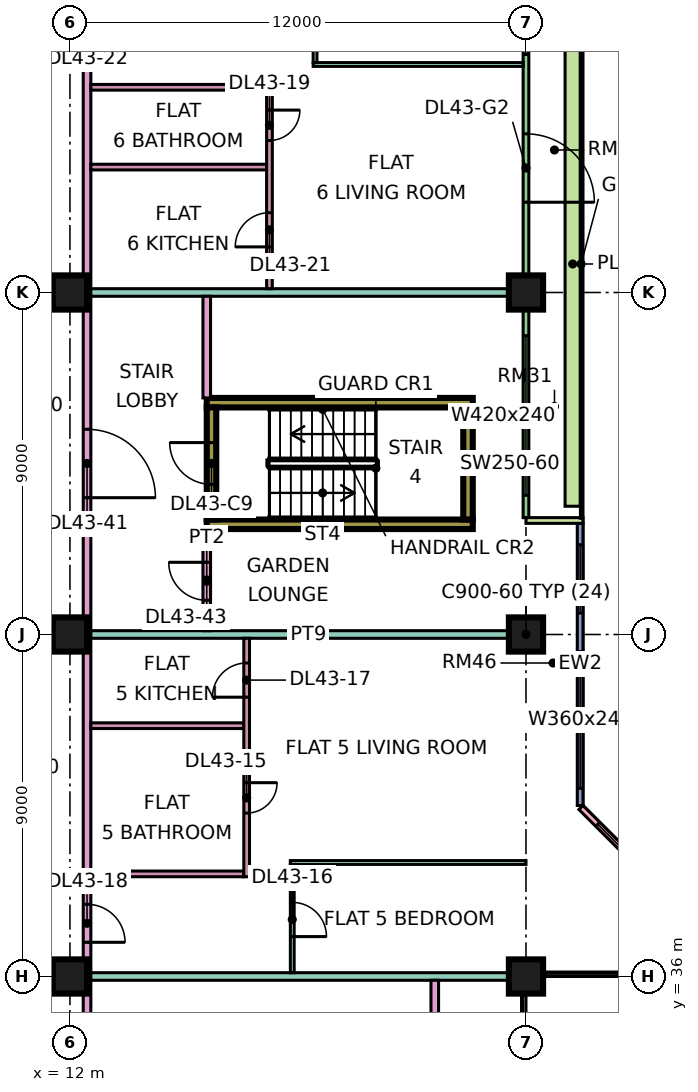
"""IFC4 building model, lengths in metres.
Left out: names, types, materials, properties, quantities, classifications, styles, units other than length and angle.
Written with IfcOpenShell. Run it as: python <this file> out.ifc"""

import sys

from ifc_helpers import new_model, si_unit, direction, frame, frame_2d, origin, origin_2d, place, context, subcontext, project, spatial, rectangle, extrude, element, fill, save


model = new_model("IFC4")
c1 = context("Model", 3, precision=1e-05, world=origin(), true_north=direction((0.0, 1.0)))
c2 = subcontext(c1, "Body", "Model", "MODEL_VIEW")
j1 = project(units=[si_unit("LENGTHUNIT", "METRE"), si_unit("PLANEANGLEUNIT", "RADIAN")], contexts=[c1])
p1 = place(None, origin())
s1 = spatial("IfcSite", under=j1, at=p1, CompositionType="ELEMENT")
p2 = place(p1, origin())
s2 = spatial("IfcBuilding", under=s1, at=p2, CompositionType="ELEMENT")
p3 = place(p2, frame((0.0, 0.0, 187.4)))
s3 = spatial("IfcBuildingStorey", under=s2, at=p3, CompositionType="ELEMENT", Elevation=187.4)
for number, where, z_axis, x_axis in (
    (1, (12.0, 36.0, 0.0), (0.0, 0.0, 1.0), (1.0, 0.0, 0.0)),
    (2, (12.0, 45.0, 0.0), (0.0, 0.0, 1.0), (1.0, 0.0, 0.0)),
    (3, (12.0, 54.0, 0.0), (0.0, 0.0, 1.0), (1.0, 0.0, 0.0)),
    (4, (24.0, 36.0, 0.0), (0.0, 0.0, 1.0), (1.0, 0.0, 0.0)),
    (5, (24.0, 45.0, 0.0), (0.0, 0.0, 1.0), (1.0, 0.0, 0.0)),
    (6, (24.0, 54.0, 0.0), (0.0, 0.0, 1.0), (1.0, 0.0, 0.0)),
):
    element("IfcColumn", number, at=place(p3, frame(where, z_axis=z_axis, x_axis=x_axis)), inside=s3, PredefinedType="COLUMN", context=c2, shape_type="SweptSolid", body=[
        extrude(rectangle(XDim=0.9, YDim=0.9, at=origin_2d()), origin(), (0.0, 0.0, 1.0), 3.75),
    ])
for number, where, z_axis, x_axis in (
    (7, (15.6, 47.9, 0.0), (0.0, 0.0, 1.0), (1.0, 0.0, 0.0)),
    (8, (15.6, 51.1, 0.0), (0.0, 0.0, 1.0), (1.0, 0.0, 0.0)),
):
    element("IfcWall", number, at=place(p3, frame(where, z_axis=z_axis, x_axis=x_axis)), inside=s3, PredefinedType="SHEAR", context=c2, shape_type="SweptSolid", body=[
        extrude(rectangle(XDim=7.0, YDim=0.25, at=frame_2d((3.5, 0.0))), origin(), (0.0, 0.0, 1.0), 3.75),
    ])
p4 = place(p3, frame((15.725, 48.025, 0.0), z_axis=(0.0, 0.0, 1.0), x_axis=(0.0, 1.0, 0.0)))
e9 = element("IfcWall", 9, at=p4, inside=s3, PredefinedType="SHEAR", context=c2, shape_type="SweptSolid", body=[
    extrude(rectangle(XDim=2.95, YDim=0.25, at=frame_2d((1.475, 0.0))), origin(), (0.0, 0.0, 1.0), 3.75),
])
p5 = place(p4, frame((0.925, 0.0, 0.0)))
e10 = element("IfcOpeningElement", 10, at=p5, cuts=e9, PredefinedType="OPENING", context=c2, shape_type="SweptSolid", body=[
    extrude(rectangle(XDim=1.1, YDim=2.2, at=frame_2d((0.55, 1.1))), frame((0.0, 0.135, 0.0), z_axis=(0.0, -1.0, 0.0), x_axis=(1.0, 0.0, 0.0)), (0.0, 0.0, 1.0), 0.27),
])
p6 = place(p3, frame((22.475, 48.025, 0.0), z_axis=(0.0, 0.0, 1.0), x_axis=(0.0, 1.0, 0.0)))
e11 = element("IfcWall", 11, at=p6, inside=s3, PredefinedType="SHEAR", context=c2, shape_type="SweptSolid", body=[
    extrude(rectangle(XDim=2.95, YDim=0.25, at=frame_2d((1.475, 0.0))), origin(), (0.0, 0.0, 1.0), 3.75),
])
p7 = place(p3, frame((28.447, 37.447, 0.0), z_axis=(0.0, 0.0, 1.0), x_axis=(-0.707106781187, 0.707106781187, 0.0)))
e12 = element("IfcWall", 12, at=p7, inside=s3, PredefinedType="SOLIDWALL", context=c2, shape_type="SweptSolid", body=[
    extrude(rectangle(XDim=4.243, YDim=0.15, at=frame_2d((2.121, 0.0))), origin(), (0.0, 0.0, 1.0), 3.35),
])
p8 = place(p7, frame((0.621, 0.0, 0.45)))
e13 = element("IfcOpeningElement", 13, at=p8, cuts=e12, PredefinedType="OPENING", context=c2, shape_type="SweptSolid", body=[
    extrude(rectangle(XDim=3.0, YDim=2.4, at=frame_2d((1.5, 1.2))), frame((0.0, 0.085, 0.0), z_axis=(0.0, -1.0, 0.0), x_axis=(1.0, 0.0, 0.0)), (0.0, 0.0, 1.0), 0.17),
])
p9 = place(p3, frame((25.425, 40.5, 0.0), z_axis=(0.0, 0.0, 1.0), x_axis=(0.0, 1.0, 0.0)))
e14 = element("IfcWall", 14, at=p9, inside=s3, PredefinedType="SOLIDWALL", context=c2, shape_type="SweptSolid", body=[
    extrude(rectangle(XDim=7.425, YDim=0.15, at=frame_2d((3.712, 0.0))), origin(), (0.0, 0.0, 1.0), 3.35),
])
p10 = place(p9, frame((0.45, 0.0, 0.45)))
e15 = element("IfcOpeningElement", 15, at=p10, cuts=e14, PredefinedType="OPENING", context=c2, shape_type="SweptSolid", body=[
    extrude(rectangle(XDim=3.6, YDim=2.4, at=frame_2d((1.8, 1.2))), frame((0.0, 0.085, 0.0), z_axis=(0.0, -1.0, 0.0), x_axis=(1.0, 0.0, 0.0)), (0.0, 0.0, 1.0), 0.17),
])
p11 = place(p9, frame((5.062, 0.0, 0.45)))
e16 = element("IfcOpeningElement", 16, at=p11, cuts=e14, PredefinedType="OPENING", context=c2, shape_type="SweptSolid", body=[
    extrude(rectangle(XDim=1.8, YDim=2.4, at=frame_2d((0.9, 1.2))), frame((0.0, 0.085, 0.0), z_axis=(0.0, -1.0, 0.0), x_axis=(1.0, 0.0, 0.0)), (0.0, 0.0, 1.0), 0.17),
])
p12 = place(p3, frame((24.0, 48.075, 0.0), z_axis=(0.0, 0.0, 1.0), x_axis=(0.0, 1.0, 0.0)))
e17 = element("IfcWall", 17, at=p12, inside=s3, PredefinedType="SOLIDWALL", context=c2, shape_type="SweptSolid", body=[
    extrude(rectangle(XDim=13.35, YDim=0.15, at=frame_2d((6.675, 0.0))), origin(), (0.0, 0.0, 1.0), 3.35),
])
p13 = place(p12, frame((0.587, 0.0, 0.45)))
e18 = element("IfcOpeningElement", 18, at=p13, cuts=e17, PredefinedType="OPENING", context=c2, shape_type="SweptSolid", body=[
    extrude(rectangle(XDim=4.2, YDim=2.4, at=frame_2d((2.1, 1.2))), frame((0.0, 0.085, 0.0), z_axis=(0.0, -1.0, 0.0), x_axis=(1.0, 0.0, 0.0)), (0.0, 0.0, 1.0), 0.17),
])
p14 = place(p12, frame((8.3, 0.0, 0.0)))
e19 = element("IfcOpeningElement", 19, at=p14, cuts=e17, PredefinedType="OPENING", context=c2, shape_type="SweptSolid", body=[
    extrude(rectangle(XDim=1.8, YDim=2.4, at=frame_2d((0.9, 1.2))), frame((0.0, 0.085, 0.0), z_axis=(0.0, -1.0, 0.0), x_axis=(1.0, 0.0, 0.0)), (0.0, 0.0, 1.0), 0.17),
])
p15 = place(p12, frame((12.188, 0.0, 0.45)))
e20 = element("IfcOpeningElement", 20, at=p15, cuts=e17, PredefinedType="OPENING", context=c2, shape_type="SweptSolid", body=[
    extrude(rectangle(XDim=0.9, YDim=2.4, at=frame_2d((0.45, 1.2))), frame((0.0, 0.085, 0.0), z_axis=(0.0, -1.0, 0.0), x_axis=(1.0, 0.0, 0.0)), (0.0, 0.0, 1.0), 0.17),
])
p16 = place(p3, frame((25.5, 48.0, 0.0), z_axis=(0.0, 0.0, 1.0), x_axis=(-1.0, 0.0, 0.0)))
e21 = element("IfcWall", 21, at=p16, inside=s3, PredefinedType="SOLIDWALL", context=c2, shape_type="SweptSolid", body=[
    extrude(rectangle(XDim=1.5, YDim=0.15, at=frame_2d((0.75, 0.0))), origin(), (0.0, 0.0, 1.0), 3.35),
])
p17 = place(p3, frame((25.229, 48.375, 0.0), z_axis=(0.0, 0.0, 1.0), x_axis=(0.0, 1.0, 0.0)))
e22 = element("IfcWall", 22, at=p17, inside=s3, PredefinedType="SOLIDWALL", context=c2, shape_type="SweptSolid", body=[
    extrude(rectangle(XDim=12.75, YDim=0.4, at=frame_2d((6.375, 0.0))), origin(), (0.0, 0.0, 1.0), 0.7),
])
p18 = place(p3, frame((12.45, 20.0, 0.0), z_axis=(0.0, 0.0, 1.0), x_axis=(0.0, 1.0, 0.0)))
e23 = element("IfcWall", 23, at=p18, inside=s3, PredefinedType="PARTITIONING", context=c2, shape_type="SweptSolid", body=[
    extrude(rectangle(XDim=43.0, YDim=0.2, at=frame_2d((21.5, 0.0))), origin(), (0.0, 0.0, 1.0), 3.35),
])
p19 = place(p18, frame((6.7, 0.0, 0.0)))
e24 = element("IfcOpeningElement", 24, at=p19, cuts=e23, PredefinedType="OPENING", context=c2, shape_type="SweptSolid", body=[
    extrude(rectangle(XDim=1.6, YDim=2.1, at=frame_2d((0.8, 1.05))), frame((0.0, 0.11, 0.0), z_axis=(0.0, -1.0, 0.0), x_axis=(1.0, 0.0, 0.0)), (0.0, 0.0, 1.0), 0.22),
])
p20 = place(p18, frame((12.95, 0.0, 0.0)))
e25 = element("IfcOpeningElement", 25, at=p20, cuts=e23, PredefinedType="OPENING", context=c2, shape_type="SweptSolid", body=[
    extrude(rectangle(XDim=1.0, YDim=2.1, at=frame_2d((0.5, 1.05))), frame((0.0, 0.11, 0.0), z_axis=(0.0, -1.0, 0.0), x_axis=(1.0, 0.0, 0.0)), (0.0, 0.0, 1.0), 0.22),
])
p21 = place(p18, frame((16.9, 0.0, 0.0)))
e26 = element("IfcOpeningElement", 26, at=p21, cuts=e23, PredefinedType="OPENING", context=c2, shape_type="SweptSolid", body=[
    extrude(rectangle(XDim=1.0, YDim=2.1, at=frame_2d((0.5, 1.05))), frame((0.0, 0.11, 0.0), z_axis=(0.0, -1.0, 0.0), x_axis=(1.0, 0.0, 0.0)), (0.0, 0.0, 1.0), 0.22),
])
p22 = place(p18, frame((40.75, 0.0, 0.0)))
e27 = element("IfcOpeningElement", 27, at=p22, cuts=e23, PredefinedType="OPENING", context=c2, shape_type="SweptSolid", body=[
    extrude(rectangle(XDim=1.0, YDim=2.1, at=frame_2d((0.5, 1.05))), frame((0.0, 0.11, 0.0), z_axis=(0.0, -1.0, 0.0), x_axis=(1.0, 0.0, 0.0)), (0.0, 0.0, 1.0), 0.22),
])
p23 = place(p18, frame((1.15, 0.0, 0.0)))
e28 = element("IfcOpeningElement", 28, at=p23, cuts=e23, PredefinedType="OPENING", context=c2, shape_type="SweptSolid", body=[
    extrude(rectangle(XDim=1.8, YDim=2.1, at=frame_2d((0.9, 1.05))), frame((0.0, 0.11, 0.0), z_axis=(0.0, -1.0, 0.0), x_axis=(1.0, 0.0, 0.0)), (0.0, 0.0, 1.0), 0.22),
])
p24 = place(p18, frame((28.6, 0.0, 0.0)))
e29 = element("IfcOpeningElement", 29, at=p24, cuts=e23, PredefinedType="OPENING", context=c2, shape_type="SweptSolid", body=[
    extrude(rectangle(XDim=1.8, YDim=2.1, at=frame_2d((0.9, 1.05))), frame((0.0, 0.11, 0.0), z_axis=(0.0, -1.0, 0.0), x_axis=(1.0, 0.0, 0.0)), (0.0, 0.0, 1.0), 0.22),
])
p25 = place(p3, frame((12.55, 36.0, 0.0), z_axis=(0.0, 0.0, 1.0), x_axis=(1.0, 0.0, 0.0)))
e30 = element("IfcWall", 30, at=p25, inside=s3, PredefinedType="PARTITIONING", context=c2, shape_type="SweptSolid", body=[
    extrude(rectangle(XDim=11.45, YDim=0.2, at=frame_2d((5.725, 0.0))), origin(), (0.0, 0.0, 1.0), 3.35),
])
for number, where, z_axis, x_axis in (
    (31, (12.55, 38.7, 0.0), (0.0, 0.0, 1.0), (1.0, 0.0, 0.0)),
    (32, (12.55, 42.6, 0.0), (0.0, 0.0, 1.0), (1.0, 0.0, 0.0)),
):
    element("IfcWall", number, at=place(p3, frame(where, z_axis=z_axis, x_axis=x_axis)), inside=s3, PredefinedType="PARTITIONING", context=c2, shape_type="SweptSolid", body=[
        extrude(rectangle(XDim=4.025, YDim=0.15, at=frame_2d((2.012, 0.0))), origin(), (0.0, 0.0, 1.0), 3.35),
    ])
p26 = place(p3, frame((12.55, 45.0, 0.0), z_axis=(0.0, 0.0, 1.0), x_axis=(1.0, 0.0, 0.0)))
e33 = element("IfcWall", 33, at=p26, inside=s3, PredefinedType="PARTITIONING", context=c2, shape_type="SweptSolid", body=[
    extrude(rectangle(XDim=11.45, YDim=0.2, at=frame_2d((5.725, 0.0))), origin(), (0.0, 0.0, 1.0), 3.35),
])
p27 = place(p3, frame((12.55, 54.0, 0.0), z_axis=(0.0, 0.0, 1.0), x_axis=(1.0, 0.0, 0.0)))
e34 = element("IfcWall", 34, at=p27, inside=s3, PredefinedType="PARTITIONING", context=c2, shape_type="SweptSolid", body=[
    extrude(rectangle(XDim=11.376, YDim=0.2, at=frame_2d((5.688, 0.0))), origin(), (0.0, 0.0, 1.0), 3.35),
])
for number, where, z_axis, x_axis in (
    (35, (12.55, 57.3, 0.0), (0.0, 0.0, 1.0), (1.0, 0.0, 0.0)),
    (36, (12.55, 59.4, 0.0), (0.0, 0.0, 1.0), (1.0, 0.0, 0.0)),
):
    element("IfcWall", number, at=place(p3, frame(where, z_axis=z_axis, x_axis=x_axis)), inside=s3, PredefinedType="PARTITIONING", context=c2, shape_type="SweptSolid", body=[
        extrude(rectangle(XDim=4.625, YDim=0.15, at=frame_2d((2.312, 0.0))), origin(), (0.0, 0.0, 1.0), 3.35),
    ])
p28 = place(p3, frame((15.6, 45.1, 0.0), z_axis=(0.0, 0.0, 1.0), x_axis=(0.0, 1.0, 0.0)))
e37 = element("IfcWall", 37, at=p28, inside=s3, PredefinedType="PARTITIONING", context=c2, shape_type="SweptSolid", body=[
    extrude(rectangle(XDim=2.675, YDim=0.2, at=frame_2d((1.337, 0.0))), origin(), (0.0, 0.0, 1.0), 3.35),
])
p29 = place(p28, frame((0.8, 0.0, 0.0)))
e38 = element("IfcOpeningElement", 38, at=p29, cuts=e37, PredefinedType="OPENING", context=c2, shape_type="SweptSolid", body=[
    extrude(rectangle(XDim=1.0, YDim=2.1, at=frame_2d((0.5, 1.05))), frame((0.0, 0.11, 0.0), z_axis=(0.0, -1.0, 0.0), x_axis=(1.0, 0.0, 0.0)), (0.0, 0.0, 1.0), 0.22),
])
p30 = place(p3, frame((15.6, 51.225, 0.0), z_axis=(0.0, 0.0, 1.0), x_axis=(0.0, 1.0, 0.0)))
e39 = element("IfcWall", 39, at=p30, inside=s3, PredefinedType="PARTITIONING", context=c2, shape_type="SweptSolid", body=[
    extrude(rectangle(XDim=2.675, YDim=0.2, at=frame_2d((1.337, 0.0))), origin(), (0.0, 0.0, 1.0), 3.35),
])
p31 = place(p3, frame((16.65, 38.625, 0.0), z_axis=(0.0, 0.0, 1.0), x_axis=(0.0, 1.0, 0.0)))
e40 = element("IfcWall", 40, at=p31, inside=s3, PredefinedType="PARTITIONING", context=c2, shape_type="SweptSolid", body=[
    extrude(rectangle(XDim=6.275, YDim=0.15, at=frame_2d((3.137, 0.0))), origin(), (0.0, 0.0, 1.0), 3.35),
])
p32 = place(p31, frame((1.675, 0.0, 0.0)))
e41 = element("IfcOpeningElement", 41, at=p32, cuts=e40, PredefinedType="OPENING", context=c2, shape_type="SweptSolid", body=[
    extrude(rectangle(XDim=0.8, YDim=2.1, at=frame_2d((0.4, 1.05))), frame((0.0, 0.085, 0.0), z_axis=(0.0, -1.0, 0.0), x_axis=(1.0, 0.0, 0.0)), (0.0, 0.0, 1.0), 0.17),
])
p33 = place(p31, frame((4.725, 0.0, 0.0)))
e42 = element("IfcOpeningElement", 42, at=p33, cuts=e40, PredefinedType="OPENING", context=c2, shape_type="SweptSolid", body=[
    extrude(rectangle(XDim=0.9, YDim=2.1, at=frame_2d((0.45, 1.05))), frame((0.0, 0.085, 0.0), z_axis=(0.0, -1.0, 0.0), x_axis=(1.0, 0.0, 0.0)), (0.0, 0.0, 1.0), 0.17),
])
p34 = place(p3, frame((17.25, 54.1, 0.0), z_axis=(0.0, 0.0, 1.0), x_axis=(0.0, 1.0, 0.0)))
e43 = element("IfcWall", 43, at=p34, inside=s3, PredefinedType="PARTITIONING", context=c2, shape_type="SweptSolid", body=[
    extrude(rectangle(XDim=5.375, YDim=0.15, at=frame_2d((2.688, 0.0))), origin(), (0.0, 0.0, 1.0), 3.35),
])
p35 = place(p34, frame((3.9, 0.0, 0.0)))
e44 = element("IfcOpeningElement", 44, at=p35, cuts=e43, PredefinedType="OPENING", context=c2, shape_type="SweptSolid", body=[
    extrude(rectangle(XDim=0.8, YDim=2.1, at=frame_2d((0.4, 1.05))), frame((0.0, 0.085, 0.0), z_axis=(0.0, -1.0, 0.0), x_axis=(1.0, 0.0, 0.0)), (0.0, 0.0, 1.0), 0.17),
])
p36 = place(p34, frame((1.1, 0.0, 0.0)))
e45 = element("IfcOpeningElement", 45, at=p36, cuts=e43, PredefinedType="OPENING", context=c2, shape_type="SweptSolid", body=[
    extrude(rectangle(XDim=0.9, YDim=2.1, at=frame_2d((0.45, 1.05))), frame((0.0, 0.085, 0.0), z_axis=(0.0, -1.0, 0.0), x_axis=(1.0, 0.0, 0.0)), (0.0, 0.0, 1.0), 0.17),
])
p37 = place(p3, frame((17.8, 39.0, 0.0), z_axis=(0.0, 0.0, 1.0), x_axis=(1.0, 0.0, 0.0)))
e46 = element("IfcWall", 46, at=p37, inside=s3, PredefinedType="PARTITIONING", context=c2, shape_type="SweptSolid", body=[
    extrude(rectangle(XDim=6.2, YDim=0.1, at=frame_2d((3.1, 0.0))), origin(), (0.0, 0.0, 1.0), 3.35),
])
p38 = place(p3, frame((17.85, 36.1, 0.0), z_axis=(0.0, 0.0, 1.0), x_axis=(0.0, 1.0, 0.0)))
e47 = element("IfcWall", 47, at=p38, inside=s3, PredefinedType="PARTITIONING", context=c2, shape_type="SweptSolid", body=[
    extrude(rectangle(XDim=2.85, YDim=0.1, at=frame_2d((1.425, 0.0))), origin(), (0.0, 0.0, 1.0), 3.35),
])
p39 = place(p38, frame((0.95, 0.0, 0.0)))
e48 = element("IfcOpeningElement", 48, at=p39, cuts=e47, PredefinedType="OPENING", context=c2, shape_type="SweptSolid", body=[
    extrude(rectangle(XDim=0.9, YDim=2.1, at=frame_2d((0.45, 1.05))), frame((0.0, 0.06, 0.0), z_axis=(0.0, -1.0, 0.0), x_axis=(1.0, 0.0, 0.0)), (0.0, 0.0, 1.0), 0.12),
])
p40 = place(p3, frame((18.4, 60.0, 0.0), z_axis=(0.0, 0.0, 1.0), x_axis=(1.0, 0.0, 0.0)))
e49 = element("IfcWall", 49, at=p40, inside=s3, PredefinedType="PARTITIONING", context=c2, shape_type="SweptSolid", body=[
    extrude(rectangle(XDim=5.526, YDim=0.1, at=frame_2d((2.763, 0.0))), origin(), (0.0, 0.0, 1.0), 3.35),
])
p41 = place(p3, frame((18.45, 60.05, 0.0), z_axis=(0.0, 0.0, 1.0), x_axis=(0.0, 1.0, 0.0)))
e50 = element("IfcWall", 50, at=p41, inside=s3, PredefinedType="PARTITIONING", context=c2, shape_type="SweptSolid", body=[
    extrude(rectangle(XDim=3.0, YDim=0.1, at=frame_2d((1.5, 0.0))), origin(), (0.0, 0.0, 1.0), 3.35),
])
p42 = place(p41, frame((1.0, 0.0, 0.0)))
e51 = element("IfcOpeningElement", 51, at=p42, cuts=e50, PredefinedType="OPENING", context=c2, shape_type="SweptSolid", body=[
    extrude(rectangle(XDim=0.9, YDim=2.1, at=frame_2d((0.45, 1.05))), frame((0.0, 0.06, 0.0), z_axis=(0.0, -1.0, 0.0), x_axis=(1.0, 0.0, 0.0)), (0.0, 0.0, 1.0), 0.12),
])
p43 = place(p3, frame((21.6, 23.9, 0.0), z_axis=(0.0, 0.0, 1.0), x_axis=(0.0, 1.0, 0.0)))
e52 = element("IfcWall", 52, at=p43, inside=s3, PredefinedType="PARTITIONING", context=c2, shape_type="SweptSolid", body=[
    extrude(rectangle(XDim=12.0, YDim=0.2, at=frame_2d((6.0, 0.0))), origin(), (0.0, 0.0, 1.0), 3.35),
])
p44 = place(p8, origin())
e53 = element("IfcWindow", 53, at=p44, inside=s3, PartitioningType="SINGLE_PANEL", PredefinedType="WINDOW", context=c2, shape_type="SweptSolid", body=[
    extrude(rectangle(XDim=3.0, YDim=2.4, at=frame_2d((1.5, 1.2))), frame((0.0, 0.03, 0.0), z_axis=(0.0, -1.0, 0.0), x_axis=(1.0, 0.0, 0.0)), (0.0, 0.0, 1.0), 0.06),
])
fill(e13, e53)
p45 = place(p10, origin())
e54 = element("IfcWindow", 54, at=p45, inside=s3, PartitioningType="SINGLE_PANEL", PredefinedType="WINDOW", context=c2, shape_type="SweptSolid", body=[
    extrude(rectangle(XDim=3.6, YDim=2.4, at=frame_2d((1.8, 1.2))), frame((0.0, 0.03, 0.0), z_axis=(0.0, -1.0, 0.0), x_axis=(1.0, 0.0, 0.0)), (0.0, 0.0, 1.0), 0.06),
])
fill(e15, e54)
p46 = place(p11, origin())
e55 = element("IfcWindow", 55, at=p46, inside=s3, PartitioningType="SINGLE_PANEL", PredefinedType="WINDOW", context=c2, shape_type="SweptSolid", body=[
    extrude(rectangle(XDim=1.8, YDim=2.4, at=frame_2d((0.9, 1.2))), frame((0.0, 0.03, 0.0), z_axis=(0.0, -1.0, 0.0), x_axis=(1.0, 0.0, 0.0)), (0.0, 0.0, 1.0), 0.06),
])
fill(e16, e55)
p47 = place(p13, origin())
e56 = element("IfcWindow", 56, at=p47, inside=s3, PartitioningType="SINGLE_PANEL", PredefinedType="WINDOW", context=c2, shape_type="SweptSolid", body=[
    extrude(rectangle(XDim=4.2, YDim=2.4, at=frame_2d((2.1, 1.2))), frame((0.0, 0.03, 0.0), z_axis=(0.0, -1.0, 0.0), x_axis=(1.0, 0.0, 0.0)), (0.0, 0.0, 1.0), 0.06),
])
fill(e18, e56)
p48 = place(p14, frame((1.8, 0.0, 0.0), z_axis=(0.0, 0.0, 1.0), x_axis=(-1.0, 0.0, 0.0)))
e57 = element("IfcDoor", 57, at=p48, inside=s3, OperationType="DOUBLE_DOOR_SINGLE_SWING", PredefinedType="DOOR", context=c2, shape_type="SweptSolid", body=[
    extrude(rectangle(XDim=1.8, YDim=2.4, at=frame_2d((0.9, 1.2))), frame((0.0, 0.025, 0.0), z_axis=(0.0, -1.0, 0.0), x_axis=(1.0, 0.0, 0.0)), (0.0, 0.0, 1.0), 0.05),
])
fill(e19, e57)
p49 = place(p15, origin())
e58 = element("IfcWindow", 58, at=p49, inside=s3, PartitioningType="SINGLE_PANEL", PredefinedType="WINDOW", context=c2, shape_type="SweptSolid", body=[
    extrude(rectangle(XDim=0.9, YDim=2.4, at=frame_2d((0.45, 1.2))), frame((0.0, 0.03, 0.0), z_axis=(0.0, -1.0, 0.0), x_axis=(1.0, 0.0, 0.0)), (0.0, 0.0, 1.0), 0.06),
])
fill(e20, e58)
p50 = place(p5, frame((1.1, 0.0, 0.0), z_axis=(0.0, 0.0, 1.0), x_axis=(-1.0, 0.0, 0.0)))
e59 = element("IfcDoor", 59, at=p50, inside=s3, OperationType="SINGLE_SWING_RIGHT", PredefinedType="DOOR", context=c2, shape_type="SweptSolid", body=[
    extrude(rectangle(XDim=1.1, YDim=2.2, at=frame_2d((0.55, 1.1))), frame((0.0, 0.025, 0.0), z_axis=(0.0, -1.0, 0.0), x_axis=(1.0, 0.0, 0.0)), (0.0, 0.0, 1.0), 0.05),
])
fill(e10, e59)
p51 = place(p32, origin())
e60 = element("IfcDoor", 60, at=p51, inside=s3, OperationType="SINGLE_SWING_RIGHT", PredefinedType="DOOR", context=c2, shape_type="SweptSolid", body=[
    extrude(rectangle(XDim=0.8, YDim=2.1, at=frame_2d((0.4, 1.05))), frame((0.0, 0.025, 0.0), z_axis=(0.0, -1.0, 0.0), x_axis=(1.0, 0.0, 0.0)), (0.0, 0.0, 1.0), 0.05),
])
fill(e41, e60)
p52 = place(p39, frame((0.9, 0.0, 0.0), z_axis=(0.0, 0.0, 1.0), x_axis=(-1.0, 0.0, 0.0)))
e61 = element("IfcDoor", 61, at=p52, inside=s3, OperationType="SINGLE_SWING_LEFT", PredefinedType="DOOR", context=c2, shape_type="SweptSolid", body=[
    extrude(rectangle(XDim=0.9, YDim=2.1, at=frame_2d((0.45, 1.05))), frame((0.0, 0.025, 0.0), z_axis=(0.0, -1.0, 0.0), x_axis=(1.0, 0.0, 0.0)), (0.0, 0.0, 1.0), 0.05),
])
fill(e48, e61)
p53 = place(p33, origin())
e62 = element("IfcDoor", 62, at=p53, inside=s3, OperationType="SINGLE_SWING_LEFT", PredefinedType="DOOR", context=c2, shape_type="SweptSolid", body=[
    extrude(rectangle(XDim=0.9, YDim=2.1, at=frame_2d((0.45, 1.05))), frame((0.0, 0.025, 0.0), z_axis=(0.0, -1.0, 0.0), x_axis=(1.0, 0.0, 0.0)), (0.0, 0.0, 1.0), 0.05),
])
fill(e42, e62)
p54 = place(p21, frame((1.0, 0.0, 0.0), z_axis=(0.0, 0.0, 1.0), x_axis=(-1.0, 0.0, 0.0)))
e63 = element("IfcDoor", 63, at=p54, inside=s3, OperationType="SINGLE_SWING_LEFT", PredefinedType="DOOR", context=c2, shape_type="SweptSolid", body=[
    extrude(rectangle(XDim=1.0, YDim=2.1, at=frame_2d((0.5, 1.05))), frame((0.0, 0.025, 0.0), z_axis=(0.0, -1.0, 0.0), x_axis=(1.0, 0.0, 0.0)), (0.0, 0.0, 1.0), 0.05),
])
fill(e26, e63)
p55 = place(p35, origin())
e64 = element("IfcDoor", 64, at=p55, inside=s3, OperationType="SINGLE_SWING_RIGHT", PredefinedType="DOOR", context=c2, shape_type="SweptSolid", body=[
    extrude(rectangle(XDim=0.8, YDim=2.1, at=frame_2d((0.4, 1.05))), frame((0.0, 0.025, 0.0), z_axis=(0.0, -1.0, 0.0), x_axis=(1.0, 0.0, 0.0)), (0.0, 0.0, 1.0), 0.05),
])
fill(e44, e64)
p56 = place(p36, origin())
e65 = element("IfcDoor", 65, at=p56, inside=s3, OperationType="SINGLE_SWING_LEFT", PredefinedType="DOOR", context=c2, shape_type="SweptSolid", body=[
    extrude(rectangle(XDim=0.9, YDim=2.1, at=frame_2d((0.45, 1.05))), frame((0.0, 0.025, 0.0), z_axis=(0.0, -1.0, 0.0), x_axis=(1.0, 0.0, 0.0)), (0.0, 0.0, 1.0), 0.05),
])
fill(e45, e65)
p57 = place(p24, frame((1.8, 0.0, 0.0), z_axis=(0.0, 0.0, 1.0), x_axis=(-1.0, 0.0, 0.0)))
e66 = element("IfcDoor", 66, at=p57, inside=s3, OperationType="DOUBLE_DOOR_SINGLE_SWING", PredefinedType="DOOR", context=c2, shape_type="SweptSolid", body=[
    extrude(rectangle(XDim=1.8, YDim=2.1, at=frame_2d((0.9, 1.05))), frame((0.0, 0.025, 0.0), z_axis=(0.0, -1.0, 0.0), x_axis=(1.0, 0.0, 0.0)), (0.0, 0.0, 1.0), 0.05),
])
fill(e29, e66)
p58 = place(p29, frame((1.0, 0.0, 0.0), z_axis=(0.0, 0.0, 1.0), x_axis=(-1.0, 0.0, 0.0)))
e67 = element("IfcDoor", 67, at=p58, inside=s3, OperationType="SINGLE_SWING_RIGHT", PredefinedType="DOOR", context=c2, shape_type="SweptSolid", body=[
    extrude(rectangle(XDim=1.0, YDim=2.1, at=frame_2d((0.5, 1.05))), frame((0.0, 0.025, 0.0), z_axis=(0.0, -1.0, 0.0), x_axis=(1.0, 0.0, 0.0)), (0.0, 0.0, 1.0), 0.05),
])
fill(e38, e67)
save(model, sys.argv[1])
